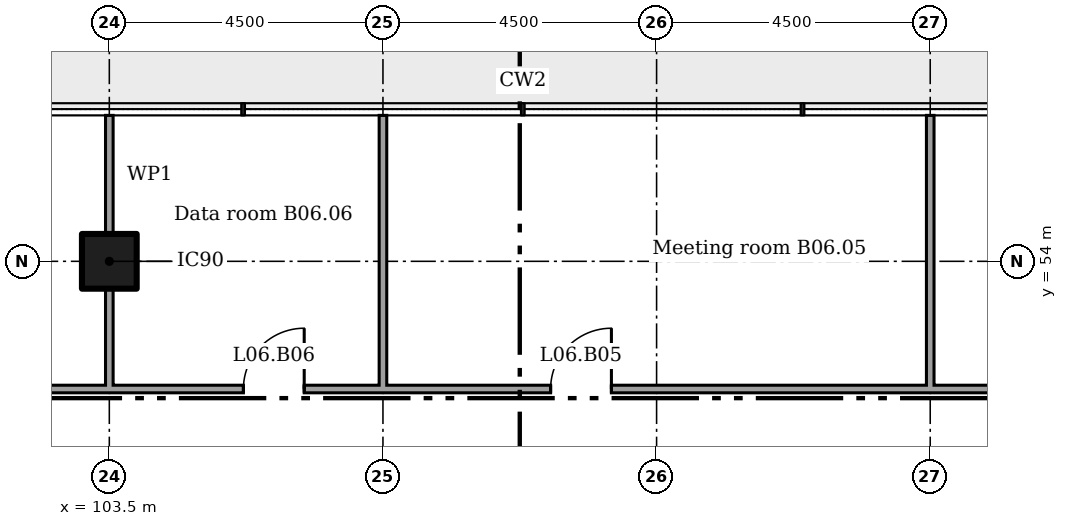
"""IFC4 building model, lengths in metres.
Left out: names, types, materials, properties, quantities, classifications, styles, units other than length and angle.
Written with IfcOpenShell. Run it as: python <this file> out.ifc"""

import sys

from ifc_helpers import new_model, si_unit, direction, frame, frame_2d, origin, origin_2d, place, context, subcontext, project, spatial, rectangle, extrude, element, fill, save


model = new_model("IFC4")
c1 = context("Model", 3, precision=1e-05, world=origin(), true_north=direction((0.0, 1.0)))
c2 = subcontext(c1, "Body", "Model", "MODEL_VIEW")
j1 = project(units=[si_unit("LENGTHUNIT", "METRE"), si_unit("PLANEANGLEUNIT", "RADIAN")], contexts=[c1])
p1 = place(None, origin())
s1 = spatial("IfcSite", under=j1, at=p1, CompositionType="ELEMENT")
p2 = place(p1, origin())
s2 = spatial("IfcBuilding", under=s1, at=p2, CompositionType="ELEMENT")
p3 = place(p2, frame((0.0, 0.0, 29.8)))
s3 = spatial("IfcBuildingStorey", under=s2, at=p3, CompositionType="ELEMENT", Elevation=29.8)
p4 = place(p3, frame((103.5, 54.0, 0.0)))
e1 = element("IfcColumn", 1, at=p4, inside=s3, PredefinedType="COLUMN", context=c2, shape_type="SweptSolid", body=[
    extrude(rectangle(XDim=0.9, YDim=0.9, at=origin_2d()), origin(), (0.0, 0.0, 1.0), 4.4),
])
p5 = place(p3, frame((101.038, 51.9, 0.0)))
e2 = element("IfcWall", 2, at=p5, inside=s3, PredefinedType="PARTITIONING", context=c2, shape_type="SweptSolid", body=[
    extrude(rectangle(XDim=19.025, YDim=0.125, at=frame_2d((9.512, 0.0))), origin(), (0.0, 0.0, 1.0), 4.225),
])
p6 = place(p5, frame((9.719, 0.0, 0.0)))
e3 = element("IfcOpeningElement", 3, at=p6, cuts=e2, PredefinedType="OPENING", context=c2, shape_type="SweptSolid", body=[
    extrude(rectangle(XDim=1.0, YDim=2.1, at=frame_2d((0.5, 1.05))), frame((0.0, 0.073, 0.0), z_axis=(0.0, -1.0, 0.0), x_axis=(1.0, 0.0, 0.0)), (0.0, 0.0, 1.0), 0.145),
])
p7 = place(p5, frame((4.667, 0.0, 0.0)))
e4 = element("IfcOpeningElement", 4, at=p7, cuts=e2, PredefinedType="OPENING", context=c2, shape_type="SweptSolid", body=[
    extrude(rectangle(XDim=1.0, YDim=2.1, at=frame_2d((0.5, 1.05))), frame((0.0, 0.073, 0.0), z_axis=(0.0, -1.0, 0.0), x_axis=(1.0, 0.0, 0.0)), (0.0, 0.0, 1.0), 0.145),
])
p8 = place(p3, frame((103.5, 51.9, 0.0), z_axis=(0.0, 0.0, 1.0), x_axis=(0.0, 1.0, 0.0)))
e5 = element("IfcWall", 5, at=p8, inside=s3, PredefinedType="PARTITIONING", context=c2, shape_type="SweptSolid", body=[
    extrude(rectangle(XDim=1.65, YDim=0.125, at=frame_2d((0.825, 0.0))), origin(), (0.0, 0.0, 1.0), 3.602),
])
p9 = place(p3, frame((103.5, 54.45, 0.0), z_axis=(0.0, 0.0, 1.0), x_axis=(0.0, 1.0, 0.0)))
e6 = element("IfcWall", 6, at=p9, inside=s3, PredefinedType="PARTITIONING", context=c2, shape_type="SweptSolid", body=[
    extrude(rectangle(XDim=1.95, YDim=0.125, at=frame_2d((0.975, 0.0))), origin(), (0.0, 0.0, 1.0), 3.602),
])
for number, where, z_axis, x_axis in (
    (7, (108.0, 51.9, 0.0), (0.0, 0.0, 1.0), (0.0, 1.0, 0.0)),
    (8, (117.0, 51.9, 0.0), (0.0, 0.0, 1.0), (0.0, 1.0, 0.0)),
):
    element("IfcWall", number, at=place(p3, frame(where, z_axis=z_axis, x_axis=x_axis)), inside=s3, PredefinedType="PARTITIONING", context=c2, shape_type="SweptSolid", body=[
        extrude(rectangle(XDim=4.5, YDim=0.125, at=frame_2d((2.25, 0.0))), origin(), (0.0, 0.0, 1.0), 3.613),
    ])
p10 = place(p6, origin())
e9 = element("IfcDoor", 9, at=p10, inside=s3, OperationType="SINGLE_SWING_LEFT", PredefinedType="DOOR", context=c2, shape_type="SweptSolid", body=[
    extrude(rectangle(XDim=1.0, YDim=2.1, at=frame_2d((0.5, 1.05))), frame((0.0, 0.025, 0.0), z_axis=(0.0, -1.0, 0.0), x_axis=(1.0, 0.0, 0.0)), (0.0, 0.0, 1.0), 0.05),
])
fill(e3, e9)
p11 = place(p7, origin())
e10 = element("IfcDoor", 10, at=p11, inside=s3, OperationType="SINGLE_SWING_LEFT", PredefinedType="DOOR", context=c2, shape_type="SweptSolid", body=[
    extrude(rectangle(XDim=1.0, YDim=2.1, at=frame_2d((0.5, 1.05))), frame((0.0, 0.025, 0.0), z_axis=(0.0, -1.0, 0.0), x_axis=(1.0, 0.0, 0.0)), (0.0, 0.0, 1.0), 0.05),
])
fill(e4, e10)
save(model, sys.argv[1])
